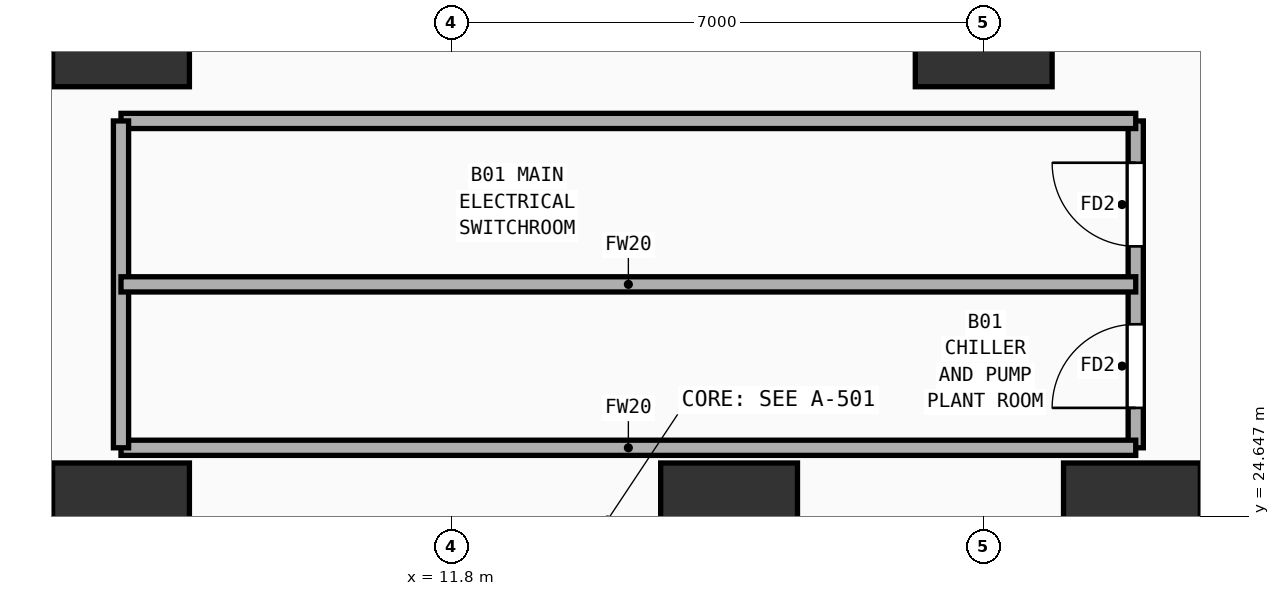
"""IFC4 building model, lengths in metres.
Left out: names, types, materials, properties, quantities, classifications, styles, units other than length and angle.
Written with IfcOpenShell. Run it as: python <this file> out.ifc"""

import sys

from ifc_helpers import new_model, si_unit, direction, frame, frame_2d, origin, origin_2d, place, context, subcontext, project, spatial, rectangle, extrude, element, fill, save


model = new_model("IFC4")
c1 = context("Model", 3, precision=1e-05, world=origin(), true_north=direction((0.0, 1.0)))
c2 = subcontext(c1, "Body", "Model", "MODEL_VIEW")
j1 = project(units=[si_unit("LENGTHUNIT", "METRE"), si_unit("PLANEANGLEUNIT", "RADIAN")], contexts=[c1])
p1 = place(None, origin())
s1 = spatial("IfcSite", under=j1, at=p1, CompositionType="ELEMENT")
p2 = place(p1, origin())
s2 = spatial("IfcBuilding", under=s1, at=p2, CompositionType="ELEMENT")
p3 = place(p2, frame((0.0, 0.0, -4.2)))
s3 = spatial("IfcBuildingStorey", under=s2, at=p3, CompositionType="ELEMENT", Elevation=-4.2)
for number, where, z_axis, x_axis in (
    (1, (7.45, 24.45, 0.0), (0.0, 0.0, 1.0), (1.0, 0.0, 0.0)),
    (2, (15.45, 24.45, 0.0), (0.0, 0.0, 1.0), (1.0, 0.0, 0.0)),
    (3, (20.75, 24.45, 0.0), (0.0, 0.0, 1.0), (1.0, 0.0, 0.0)),
    (4, (7.45, 31.2, 0.0), (0.0, 0.0, 1.0), (1.0, 0.0, 0.0)),
    (5, (18.8, 31.2, 0.0), (0.0, 0.0, 1.0), (1.0, 0.0, 0.0)),
):
    element("IfcColumn", number, at=place(p3, frame(where, z_axis=z_axis, x_axis=x_axis)), inside=s3, PredefinedType="COLUMN", context=c2, shape_type="SweptSolid", body=[
        extrude(rectangle(XDim=1.8, YDim=1.8, at=origin_2d()), origin(), (0.0, 0.0, 1.0), 3.82),
    ])
p4 = place(p3, frame((20.8, 25.55, 0.0), z_axis=(0.0, 0.0, 1.0), x_axis=(0.0, 1.0, 0.0)))
e6 = element("IfcWall", 6, at=p4, inside=s3, PredefinedType="PARTITIONING", context=c2, shape_type="SweptSolid", body=[
    extrude(rectangle(XDim=4.3, YDim=0.2, at=frame_2d((2.15, 0.0))), origin(), (0.0, 0.0, 1.0), 3.82),
])
p5 = place(p4, frame((0.525, 0.0, 0.0)))
e7 = element("IfcOpeningElement", 7, at=p5, cuts=e6, PredefinedType="OPENING", context=c2, shape_type="SweptSolid", body=[
    extrude(rectangle(XDim=1.1, YDim=2.2, at=frame_2d((0.55, 1.1))), frame((0.0, 0.11, 0.0), z_axis=(0.0, -1.0, 0.0), x_axis=(1.0, 0.0, 0.0)), (0.0, 0.0, 1.0), 0.22),
])
p6 = place(p4, frame((2.65, 0.0, 0.0)))
e8 = element("IfcOpeningElement", 8, at=p6, cuts=e6, PredefinedType="OPENING", context=c2, shape_type="SweptSolid", body=[
    extrude(rectangle(XDim=1.1, YDim=2.2, at=frame_2d((0.55, 1.1))), frame((0.0, 0.11, 0.0), z_axis=(0.0, -1.0, 0.0), x_axis=(1.0, 0.0, 0.0)), (0.0, 0.0, 1.0), 0.22),
])
for number, where, z_axis, x_axis in (
    (9, (7.45, 25.55, 0.0), (0.0, 0.0, 1.0), (1.0, 0.0, 0.0)),
    (10, (7.45, 29.85, 0.0), (0.0, 0.0, 1.0), (1.0, 0.0, 0.0)),
):
    element("IfcWall", number, at=place(p3, frame(where, z_axis=z_axis, x_axis=x_axis)), inside=s3, PredefinedType="PARTITIONING", context=c2, shape_type="SweptSolid", body=[
        extrude(rectangle(XDim=13.35, YDim=0.2, at=frame_2d((6.675, 0.0))), origin(), (0.0, 0.0, 1.0), 3.82),
    ])
p7 = place(p3, frame((7.45, 25.55, 0.0), z_axis=(0.0, 0.0, 1.0), x_axis=(0.0, 1.0, 0.0)))
e11 = element("IfcWall", 11, at=p7, inside=s3, PredefinedType="PARTITIONING", context=c2, shape_type="SweptSolid", body=[
    extrude(rectangle(XDim=4.3, YDim=0.2, at=frame_2d((2.15, 0.0))), origin(), (0.0, 0.0, 1.0), 3.17),
])
p8 = place(p3, frame((7.45, 27.7, 0.0), z_axis=(0.0, 0.0, 1.0), x_axis=(1.0, 0.0, 0.0)))
e12 = element("IfcWall", 12, at=p8, inside=s3, PredefinedType="PARTITIONING", context=c2, shape_type="SweptSolid", body=[
    extrude(rectangle(XDim=13.35, YDim=0.2, at=frame_2d((6.675, 0.0))), origin(), (0.0, 0.0, 1.0), 3.82),
])
p9 = place(p5, frame((1.1, 0.0, 0.0), z_axis=(0.0, 0.0, 1.0), x_axis=(-1.0, 0.0, 0.0)))
e13 = element("IfcDoor", 13, at=p9, inside=s3, OperationType="SINGLE_SWING_RIGHT", PredefinedType="DOOR", context=c2, shape_type="SweptSolid", body=[
    extrude(rectangle(XDim=1.1, YDim=2.2, at=frame_2d((0.55, 1.1))), frame((0.0, 0.025, 0.0), z_axis=(0.0, -1.0, 0.0), x_axis=(1.0, 0.0, 0.0)), (0.0, 0.0, 1.0), 0.05),
])
fill(e7, e13)
p10 = place(p6, frame((1.1, 0.0, 0.0), z_axis=(0.0, 0.0, 1.0), x_axis=(-1.0, 0.0, 0.0)))
e14 = element("IfcDoor", 14, at=p10, inside=s3, OperationType="SINGLE_SWING_LEFT", PredefinedType="DOOR", context=c2, shape_type="SweptSolid", body=[
    extrude(rectangle(XDim=1.1, YDim=2.2, at=frame_2d((0.55, 1.1))), frame((0.0, 0.025, 0.0), z_axis=(0.0, -1.0, 0.0), x_axis=(1.0, 0.0, 0.0)), (0.0, 0.0, 1.0), 0.05),
])
fill(e8, e14)
save(model, sys.argv[1])
